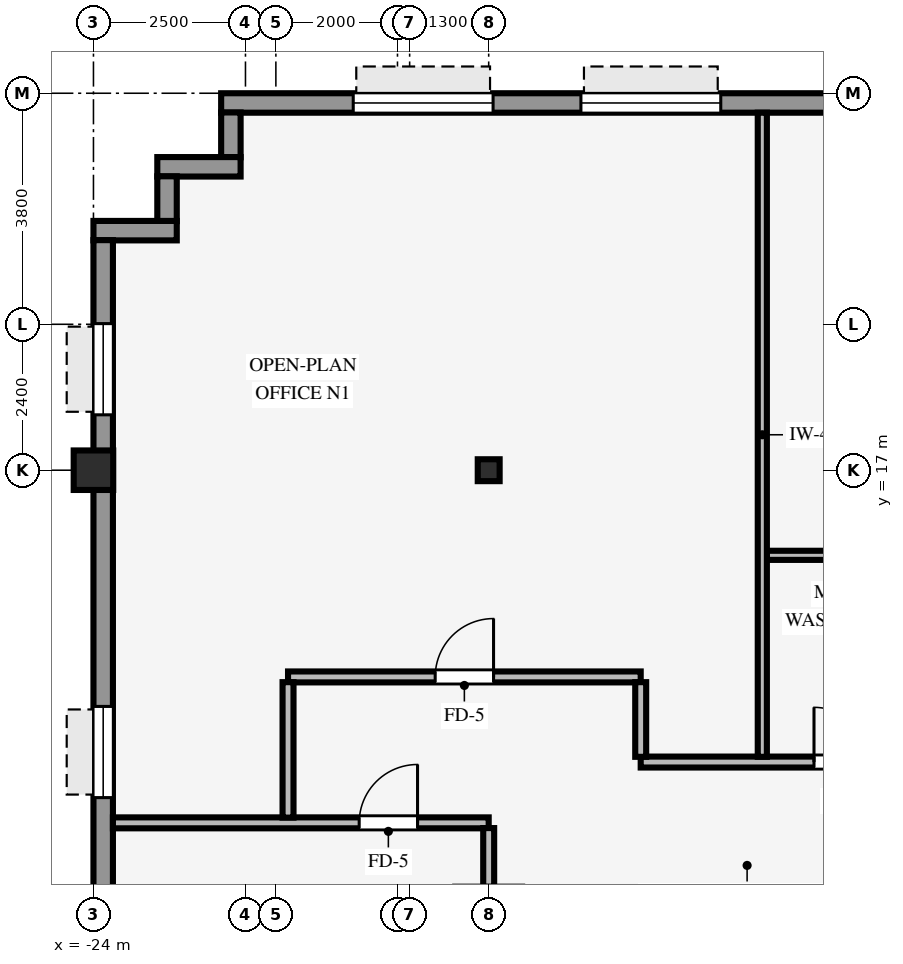
"""IFC4 building model, lengths in metres.
Left out: names, types, materials, properties, quantities, classifications, styles, units other than length and angle.
Written with IfcOpenShell. Run it as: python <this file> out.ifc"""

import sys

from ifc_helpers import new_model, si_unit, direction, frame, frame_2d, origin, origin_2d, place, context, subcontext, project, spatial, rectangle, hollow_rectangle, i_section, extrude, source, transform, mapped, element, fill, save


model = new_model("IFC4")
c1 = context("Model", 3, precision=1e-05, world=origin(), true_north=direction((0.0, 1.0)))
c2 = subcontext(c1, "Body", "Model", "MODEL_VIEW")
j1 = project(units=[si_unit("LENGTHUNIT", "METRE"), si_unit("PLANEANGLEUNIT", "RADIAN")], contexts=[c1])
p1 = place(None, origin())
s1 = spatial("IfcSite", under=j1, at=p1, CompositionType="ELEMENT")
p2 = place(p1, origin())
s2 = spatial("IfcBuilding", under=s1, at=p2, CompositionType="ELEMENT")
p3 = place(p2, frame((0.0, 0.0, 98.3)))
s3 = spatial("IfcBuildingStorey", under=s2, at=p3, CompositionType="ELEMENT", Elevation=98.3)
p4 = place(p3, frame((-24.0, 17.0, 0.0), z_axis=(0.0, 0.0, 1.0), x_axis=(1.0, 0.0, 0.0)))
e1 = element("IfcColumn", 1, at=p4, inside=s3, PredefinedType="COLUMN", context=c2, shape_type="SweptSolid", body=[
    extrude(hollow_rectangle(XDim=0.65, YDim=0.65, WallThickness=0.04, InnerFilletRadius=0.04, OuterFilletRadius=0.08, at=origin_2d()), origin(), (0.0, 0.0, 1.0), 3.37),
])
p5 = place(p3, frame((-17.5, 17.0, 0.0), z_axis=(0.0, 0.0, 1.0), x_axis=(1.0, 0.0, 0.0)))
e2 = element("IfcColumn", 2, at=p5, inside=s3, PredefinedType="COLUMN", context=c2, shape_type="SweptSolid", body=[
    extrude(i_section(OverallWidth=0.36, OverallDepth=0.36, WebThickness=0.021, FlangeThickness=0.021, FilletRadius=0.018, at=origin_2d()), origin(), (0.0, 0.0, 1.0), 3.37),
])
p6 = place(p3, frame((-21.9, 23.04, 0.0), z_axis=(0.0, 0.0, 1.0), x_axis=(1.0, 0.0, 0.0)))
e3 = element("IfcWall", 3, at=p6, inside=s3, PredefinedType="STANDARD", context=c2, shape_type="SweptSolid", body=[
    extrude(rectangle(XDim=43.8, YDim=0.32, at=frame_2d((21.9, 0.0))), origin(), (0.0, 0.0, 1.0), 2.705),
])
p7 = place(p6, frame((26.85, 0.0, 0.0)))
e4 = element("IfcOpeningElement", 4, at=p7, cuts=e3, PredefinedType="OPENING", context=c2, shape_type="SweptSolid", body=[
    extrude(rectangle(XDim=1.05, YDim=2.1, at=frame_2d((0.525, 1.05))), frame((0.0, 0.17, 0.0), z_axis=(0.0, -1.0, 0.0), x_axis=(1.0, 0.0, 0.0)), (0.0, 0.0, 1.0), 0.34),
])
p8 = place(p6, frame((2.172, 0.0, 0.8)))
e5 = element("IfcOpeningElement", 5, at=p8, cuts=e3, PredefinedType="OPENING", context=c2, shape_type="SweptSolid", body=[
    extrude(rectangle(XDim=2.3, YDim=1.62, at=frame_2d((1.15, 0.81))), frame((0.0, 0.17, 0.0), z_axis=(0.0, -1.0, 0.0), x_axis=(1.0, 0.0, 0.0)), (0.0, 0.0, 1.0), 0.34),
])
p9 = place(p6, frame((5.917, 0.0, 0.8)))
e6 = element("IfcOpeningElement", 6, at=p9, cuts=e3, PredefinedType="OPENING", context=c2, shape_type="SweptSolid", body=[
    extrude(rectangle(XDim=2.3, YDim=1.62, at=frame_2d((1.15, 0.81))), frame((0.0, 0.17, 0.0), z_axis=(0.0, -1.0, 0.0), x_axis=(1.0, 0.0, 0.0)), (0.0, 0.0, 1.0), 0.34),
])
p10 = place(p6, frame((16.106, 0.0, 0.8)))
e7 = element("IfcOpeningElement", 7, at=p10, cuts=e3, PredefinedType="OPENING", context=c2, shape_type="SweptSolid", body=[
    extrude(rectangle(XDim=2.3, YDim=1.62, at=frame_2d((1.15, 0.81))), frame((0.0, 0.17, 0.0), z_axis=(0.0, -1.0, 0.0), x_axis=(1.0, 0.0, 0.0)), (0.0, 0.0, 1.0), 0.34),
])
p11 = place(p6, frame((34.683, 0.0, 0.8)))
e8 = element("IfcOpeningElement", 8, at=p11, cuts=e3, PredefinedType="OPENING", context=c2, shape_type="SweptSolid", body=[
    extrude(rectangle(XDim=2.3, YDim=1.62, at=frame_2d((1.15, 0.81))), frame((0.0, 0.17, 0.0), z_axis=(0.0, -1.0, 0.0), x_axis=(1.0, 0.0, 0.0)), (0.0, 0.0, 1.0), 0.34),
])
p12 = place(p6, frame((39.328, 0.0, 0.8)))
e9 = element("IfcOpeningElement", 9, at=p12, cuts=e3, PredefinedType="OPENING", context=c2, shape_type="SweptSolid", body=[
    extrude(rectangle(XDim=2.3, YDim=1.62, at=frame_2d((1.15, 0.81))), frame((0.0, 0.17, 0.0), z_axis=(0.0, -1.0, 0.0), x_axis=(1.0, 0.0, 0.0)), (0.0, 0.0, 1.0), 0.34),
])
p13 = place(p3, frame((-21.74, 22.146, 0.0), z_axis=(0.0, 0.0, 1.0), x_axis=(0.0, 1.0, 0.0)))
e10 = element("IfcWall", 10, at=p13, inside=s3, PredefinedType="STANDARD", context=c2, shape_type="SweptSolid", body=[
    extrude(rectangle(XDim=0.738, YDim=0.32, at=frame_2d((0.369, 0.0))), origin(), (0.0, 0.0, 1.0), 3.36),
])
p14 = place(p3, frame((-22.95, 21.99, 0.0), z_axis=(0.0, 0.0, 1.0), x_axis=(1.0, 0.0, 0.0)))
e11 = element("IfcWall", 11, at=p14, inside=s3, PredefinedType="STANDARD", context=c2, shape_type="SweptSolid", body=[
    extrude(rectangle(XDim=1.37, YDim=0.32, at=frame_2d((0.685, 0.0))), origin(), (0.0, 0.0, 1.0), 3.36),
])
p15 = place(p3, frame((-22.79, 21.096, 0.0), z_axis=(0.0, 0.0, 1.0), x_axis=(0.0, 1.0, 0.0)))
e12 = element("IfcWall", 12, at=p15, inside=s3, PredefinedType="STANDARD", context=c2, shape_type="SweptSolid", body=[
    extrude(rectangle(XDim=0.738, YDim=0.32, at=frame_2d((0.369, 0.0))), origin(), (0.0, 0.0, 1.0), 3.36),
])
p16 = place(p3, frame((-24.0, 20.94, 0.0), z_axis=(0.0, 0.0, 1.0), x_axis=(1.0, 0.0, 0.0)))
e13 = element("IfcWall", 13, at=p16, inside=s3, PredefinedType="STANDARD", context=c2, shape_type="SweptSolid", body=[
    extrude(rectangle(XDim=1.37, YDim=0.32, at=frame_2d((0.685, 0.0))), origin(), (0.0, 0.0, 1.0), 3.36),
])
p17 = place(p3, frame((-23.84, -20.784, 0.0), z_axis=(0.0, 0.0, 1.0), x_axis=(0.0, 1.0, 0.0)))
e14 = element("IfcWall", 14, at=p17, inside=s3, PredefinedType="STANDARD", context=c2, shape_type="SweptSolid", body=[
    extrude(rectangle(XDim=41.568, YDim=0.32, at=frame_2d((20.784, 0.0))), origin(), (0.0, 0.0, 1.0), 2.705),
])
p18 = place(p17, frame((1.373, 0.0, 0.8)))
e15 = element("IfcOpeningElement", 15, at=p18, cuts=e14, PredefinedType="OPENING", context=c2, shape_type="SweptSolid", body=[
    extrude(rectangle(XDim=1.5, YDim=1.6, at=frame_2d((0.75, 0.8))), frame((0.0, 0.17, 0.0), z_axis=(0.0, -1.0, 0.0), x_axis=(1.0, 0.0, 0.0)), (0.0, 0.0, 1.0), 0.34),
])
p19 = place(p17, frame((7.669, 0.0, 0.8)))
e16 = element("IfcOpeningElement", 16, at=p19, cuts=e14, PredefinedType="OPENING", context=c2, shape_type="SweptSolid", body=[
    extrude(rectangle(XDim=1.5, YDim=1.6, at=frame_2d((0.75, 0.8))), frame((0.0, 0.17, 0.0), z_axis=(0.0, -1.0, 0.0), x_axis=(1.0, 0.0, 0.0)), (0.0, 0.0, 1.0), 0.34),
])
p20 = place(p17, frame((12.615, 0.0, 0.8)))
e17 = element("IfcOpeningElement", 17, at=p20, cuts=e14, PredefinedType="OPENING", context=c2, shape_type="SweptSolid", body=[
    extrude(rectangle(XDim=1.5, YDim=1.6, at=frame_2d((0.75, 0.8))), frame((0.0, 0.17, 0.0), z_axis=(0.0, -1.0, 0.0), x_axis=(1.0, 0.0, 0.0)), (0.0, 0.0, 1.0), 0.34),
])
p21 = place(p17, frame((17.561, 0.0, 0.8)))
e18 = element("IfcOpeningElement", 18, at=p21, cuts=e14, PredefinedType="OPENING", context=c2, shape_type="SweptSolid", body=[
    extrude(rectangle(XDim=1.5, YDim=1.6, at=frame_2d((0.75, 0.8))), frame((0.0, 0.17, 0.0), z_axis=(0.0, -1.0, 0.0), x_axis=(1.0, 0.0, 0.0)), (0.0, 0.0, 1.0), 0.34),
])
p22 = place(p17, frame((22.507, 0.0, 0.8)))
e19 = element("IfcOpeningElement", 19, at=p22, cuts=e14, PredefinedType="OPENING", context=c2, shape_type="SweptSolid", body=[
    extrude(rectangle(XDim=1.5, YDim=1.6, at=frame_2d((0.75, 0.8))), frame((0.0, 0.17, 0.0), z_axis=(0.0, -1.0, 0.0), x_axis=(1.0, 0.0, 0.0)), (0.0, 0.0, 1.0), 0.34),
])
p23 = place(p17, frame((27.453, 0.0, 0.8)))
e20 = element("IfcOpeningElement", 20, at=p23, cuts=e14, PredefinedType="OPENING", context=c2, shape_type="SweptSolid", body=[
    extrude(rectangle(XDim=1.5, YDim=1.6, at=frame_2d((0.75, 0.8))), frame((0.0, 0.17, 0.0), z_axis=(0.0, -1.0, 0.0), x_axis=(1.0, 0.0, 0.0)), (0.0, 0.0, 1.0), 0.34),
])
p24 = place(p17, frame((32.399, 0.0, 0.8)))
e21 = element("IfcOpeningElement", 21, at=p24, cuts=e14, PredefinedType="OPENING", context=c2, shape_type="SweptSolid", body=[
    extrude(rectangle(XDim=1.5, YDim=1.6, at=frame_2d((0.75, 0.8))), frame((0.0, 0.17, 0.0), z_axis=(0.0, -1.0, 0.0), x_axis=(1.0, 0.0, 0.0)), (0.0, 0.0, 1.0), 0.34),
])
p25 = place(p17, frame((38.695, 0.0, 0.8)))
e22 = element("IfcOpeningElement", 22, at=p25, cuts=e14, PredefinedType="OPENING", context=c2, shape_type="SweptSolid", body=[
    extrude(rectangle(XDim=1.5, YDim=1.6, at=frame_2d((0.75, 0.8))), frame((0.0, 0.17, 0.0), z_axis=(0.0, -1.0, 0.0), x_axis=(1.0, 0.0, 0.0)), (0.0, 0.0, 1.0), 0.34),
])
p26 = place(p3, frame((-23.68, 11.2, 0.0), z_axis=(0.0, 0.0, 1.0), x_axis=(1.0, 0.0, 0.0)))
e23 = element("IfcWall", 23, at=p26, inside=s3, PredefinedType="PARTITIONING", context=c2, shape_type="SweptSolid", body=[
    extrude(rectangle(XDim=6.18, YDim=0.18, at=frame_2d((3.09, 0.0))), origin(), (0.0, 0.0, 1.0), 3.36),
])
p27 = place(p26, frame((4.05, 0.0, 0.0)))
e24 = element("IfcOpeningElement", 24, at=p27, cuts=e23, PredefinedType="OPENING", context=c2, shape_type="SweptSolid", body=[
    extrude(rectangle(XDim=0.96, YDim=2.1, at=frame_2d((0.48, 1.05))), frame((0.0, 0.1, 0.0), z_axis=(0.0, -1.0, 0.0), x_axis=(1.0, 0.0, 0.0)), (0.0, 0.0, 1.0), 0.2),
])
p28 = place(p3, frame((-15.0, 12.2, 0.0), z_axis=(0.0, 0.0, 1.0), x_axis=(1.0, 0.0, 0.0)))
e25 = element("IfcWall", 25, at=p28, inside=s3, PredefinedType="PARTITIONING", context=c2, shape_type="SweptSolid", body=[
    extrude(rectangle(XDim=30.0, YDim=0.18, at=frame_2d((15.0, 0.0))), origin(), (0.0, 0.0, 1.0), 3.36),
])
p29 = place(p28, frame((23.02, 0.0, 0.0)))
e26 = element("IfcOpeningElement", 26, at=p29, cuts=e25, PredefinedType="OPENING", context=c2, shape_type="SweptSolid", body=[
    extrude(rectangle(XDim=0.96, YDim=2.1, at=frame_2d((0.48, 1.05))), frame((0.0, 0.1, 0.0), z_axis=(0.0, -1.0, 0.0), x_axis=(1.0, 0.0, 0.0)), (0.0, 0.0, 1.0), 0.2),
])
p30 = place(p28, frame((16.45, 0.0, 0.0)))
e27 = element("IfcOpeningElement", 27, at=p30, cuts=e25, PredefinedType="OPENING", context=c2, shape_type="SweptSolid", body=[
    extrude(rectangle(XDim=0.96, YDim=2.1, at=frame_2d((0.48, 1.05))), frame((0.0, 0.1, 0.0), z_axis=(0.0, -1.0, 0.0), x_axis=(1.0, 0.0, 0.0)), (0.0, 0.0, 1.0), 0.2),
])
p31 = place(p28, frame((5.45, 0.0, 0.0)))
e28 = element("IfcOpeningElement", 28, at=p31, cuts=e25, PredefinedType="OPENING", context=c2, shape_type="SweptSolid", body=[
    extrude(rectangle(XDim=0.9, YDim=2.1, at=frame_2d((0.45, 1.05))), frame((0.0, 0.1, 0.0), z_axis=(0.0, -1.0, 0.0), x_axis=(1.0, 0.0, 0.0)), (0.0, 0.0, 1.0), 0.2),
])
p32 = place(p28, frame((2.85, 0.0, 0.0)))
e29 = element("IfcOpeningElement", 29, at=p32, cuts=e25, PredefinedType="OPENING", context=c2, shape_type="SweptSolid", body=[
    extrude(rectangle(XDim=0.9, YDim=2.1, at=frame_2d((0.45, 1.05))), frame((0.0, 0.1, 0.0), z_axis=(0.0, -1.0, 0.0), x_axis=(1.0, 0.0, 0.0)), (0.0, 0.0, 1.0), 0.2),
])
p33 = place(p28, frame((12.52, 0.0, 0.0)))
e30 = element("IfcOpeningElement", 30, at=p33, cuts=e25, PredefinedType="OPENING", context=c2, shape_type="SweptSolid", body=[
    extrude(rectangle(XDim=0.96, YDim=2.1, at=frame_2d((0.48, 1.05))), frame((0.0, 0.1, 0.0), z_axis=(0.0, -1.0, 0.0), x_axis=(1.0, 0.0, 0.0)), (0.0, 0.0, 1.0), 0.2),
])
p34 = place(p28, frame((7.95, 0.0, 0.0)))
e31 = element("IfcOpeningElement", 31, at=p34, cuts=e25, PredefinedType="OPENING", context=c2, shape_type="SweptSolid", body=[
    extrude(rectangle(XDim=0.9, YDim=2.1, at=frame_2d((0.45, 1.05))), frame((0.0, 0.1, 0.0), z_axis=(0.0, -1.0, 0.0), x_axis=(1.0, 0.0, 0.0)), (0.0, 0.0, 1.0), 0.2),
])
p35 = place(p3, frame((-20.8, 13.6, 0.0), z_axis=(0.0, 0.0, 1.0), x_axis=(1.0, 0.0, 0.0)))
e32 = element("IfcWall", 32, at=p35, inside=s3, PredefinedType="PARTITIONING", context=c2, shape_type="SweptSolid", body=[
    extrude(rectangle(XDim=5.8, YDim=0.18, at=frame_2d((2.9, 0.0))), origin(), (0.0, 0.0, 1.0), 2.998),
])
p36 = place(p35, frame((2.42, 0.0, 0.0)))
e33 = element("IfcOpeningElement", 33, at=p36, cuts=e32, PredefinedType="OPENING", context=c2, shape_type="SweptSolid", body=[
    extrude(rectangle(XDim=0.96, YDim=2.1, at=frame_2d((0.48, 1.05))), frame((0.0, 0.1, 0.0), z_axis=(0.0, -1.0, 0.0), x_axis=(1.0, 0.0, 0.0)), (0.0, 0.0, 1.0), 0.2),
])
p37 = place(p3, frame((-12.929, 15.6, 0.0), z_axis=(0.0, 0.0, 1.0), x_axis=(1.0, 0.0, 0.0)))
e34 = element("IfcWall", 34, at=p37, inside=s3, PredefinedType="PARTITIONING", context=c2, shape_type="SweptSolid", body=[
    extrude(rectangle(XDim=7.529, YDim=0.15, at=frame_2d((3.765, 0.0))), origin(), (0.0, 0.0, 1.0), 3.36),
])
p38 = place(p3, frame((-20.8, 11.286, 0.0), z_axis=(0.0, 0.0, 1.0), x_axis=(0.0, 1.0, 0.0)))
e35 = element("IfcWall", 35, at=p38, inside=s3, PredefinedType="PARTITIONING", context=c2, shape_type="SweptSolid", body=[
    extrude(rectangle(XDim=2.228, YDim=0.18, at=frame_2d((1.114, 0.0))), origin(), (0.0, 0.0, 1.0), 3.36),
])
p39 = place(p3, frame((-17.5, 10.146, 0.0), z_axis=(0.0, 0.0, 1.0), x_axis=(0.0, 1.0, 0.0)))
e36 = element("IfcWall", 36, at=p39, inside=s3, PredefinedType="PARTITIONING", context=c2, shape_type="SweptSolid", body=[
    extrude(rectangle(XDim=0.968, YDim=0.18, at=frame_2d((0.484, 0.0))), origin(), (0.0, 0.0, 1.0), 2.738),
])
p40 = place(p3, frame((-15.0, 12.286, 0.0), z_axis=(0.0, 0.0, 1.0), x_axis=(0.0, 1.0, 0.0)))
e37 = element("IfcWall", 37, at=p40, inside=s3, PredefinedType="PARTITIONING", context=c2, shape_type="SweptSolid", body=[
    extrude(rectangle(XDim=1.228, YDim=0.18, at=frame_2d((0.614, 0.0))), origin(), (0.0, 0.0, 1.0), 3.36),
])
p41 = place(p3, frame((-13.0, 12.286, 0.0), z_axis=(0.0, 0.0, 1.0), x_axis=(0.0, 1.0, 0.0)))
e38 = element("IfcWall", 38, at=p41, inside=s3, PredefinedType="PARTITIONING", context=c2, shape_type="SweptSolid", body=[
    extrude(rectangle(XDim=10.594, YDim=0.15, at=frame_2d((5.297, 0.0))), origin(), (0.0, 0.0, 1.0), 3.36),
])
m1 = source(origin(), c2, "Body", "SweptSolid", [
    extrude(rectangle(XDim=2.3, YDim=1.62, at=frame_2d((1.15, 0.81))), frame((0.0, 0.03, 0.0), z_axis=(0.0, -1.0, 0.0), x_axis=(1.0, 0.0, 0.0)), (0.0, 0.0, 1.0), 0.06),
])
p42 = place(p8, origin())
e39 = element("IfcWindow", 39, at=p42, inside=s3, PartitioningType="SINGLE_PANEL", PredefinedType="WINDOW", context=c2, shape_type="MappedRepresentation", body=[
    mapped(m1, transform((0.0, 0.0, 0.0), scale=1.0)),
])
fill(e5, e39)
p43 = place(p9, origin())
e40 = element("IfcWindow", 40, at=p43, inside=s3, PartitioningType="SINGLE_PANEL", PredefinedType="WINDOW", context=c2, shape_type="MappedRepresentation", body=[
    mapped(m1, transform((0.0, 0.0, 0.0), scale=1.0)),
])
fill(e6, e40)
m2 = source(origin(), c2, "Body", "SweptSolid", [
    extrude(rectangle(XDim=1.5, YDim=1.6, at=frame_2d((0.75, 0.8))), frame((0.0, 0.03, 0.0), z_axis=(0.0, -1.0, 0.0), x_axis=(1.0, 0.0, 0.0)), (0.0, 0.0, 1.0), 0.06),
])
p44 = place(p24, origin())
e41 = element("IfcWindow", 41, at=p44, inside=s3, PartitioningType="SINGLE_PANEL", PredefinedType="WINDOW", context=c2, shape_type="MappedRepresentation", body=[
    mapped(m2, transform((0.0, 0.0, 0.0), scale=1.0)),
])
fill(e21, e41)
p45 = place(p25, origin())
e42 = element("IfcWindow", 42, at=p45, inside=s3, PartitioningType="SINGLE_PANEL", PredefinedType="WINDOW", context=c2, shape_type="MappedRepresentation", body=[
    mapped(m2, transform((0.0, 0.0, 0.0), scale=1.0)),
])
fill(e22, e42)
m3 = source(origin(), c2, "Body", "SweptSolid", [
    extrude(rectangle(XDim=0.96, YDim=2.1, at=frame_2d((0.48, 1.05))), frame((0.0, 0.025, 0.0), z_axis=(0.0, -1.0, 0.0), x_axis=(1.0, 0.0, 0.0)), (0.0, 0.0, 1.0), 0.05),
])
p46 = place(p36, origin())
e43 = element("IfcDoor", 43, at=p46, inside=s3, OperationType="SINGLE_SWING_RIGHT", PredefinedType="DOOR", context=c2, shape_type="MappedRepresentation", body=[
    mapped(m3, transform((0.0, 0.0, 0.0), scale=1.0)),
])
fill(e33, e43)
p47 = place(p27, origin())
e44 = element("IfcDoor", 44, at=p47, inside=s3, OperationType="SINGLE_SWING_RIGHT", PredefinedType="DOOR", context=c2, shape_type="MappedRepresentation", body=[
    mapped(m3, transform((0.0, 0.0, 0.0), scale=1.0)),
])
fill(e24, e44)
m4 = source(origin(), c2, "Body", "SweptSolid", [
    extrude(rectangle(XDim=0.9, YDim=2.1, at=frame_2d((0.45, 1.05))), frame((0.0, 0.025, 0.0), z_axis=(0.0, -1.0, 0.0), x_axis=(1.0, 0.0, 0.0)), (0.0, 0.0, 1.0), 0.05),
])
p48 = place(p32, origin())
e45 = element("IfcDoor", 45, at=p48, inside=s3, OperationType="SINGLE_SWING_LEFT", PredefinedType="DOOR", context=c2, shape_type="MappedRepresentation", body=[
    mapped(m4, transform((0.0, 0.0, 0.0), scale=1.0)),
])
fill(e29, e45)
save(model, sys.argv[1])
